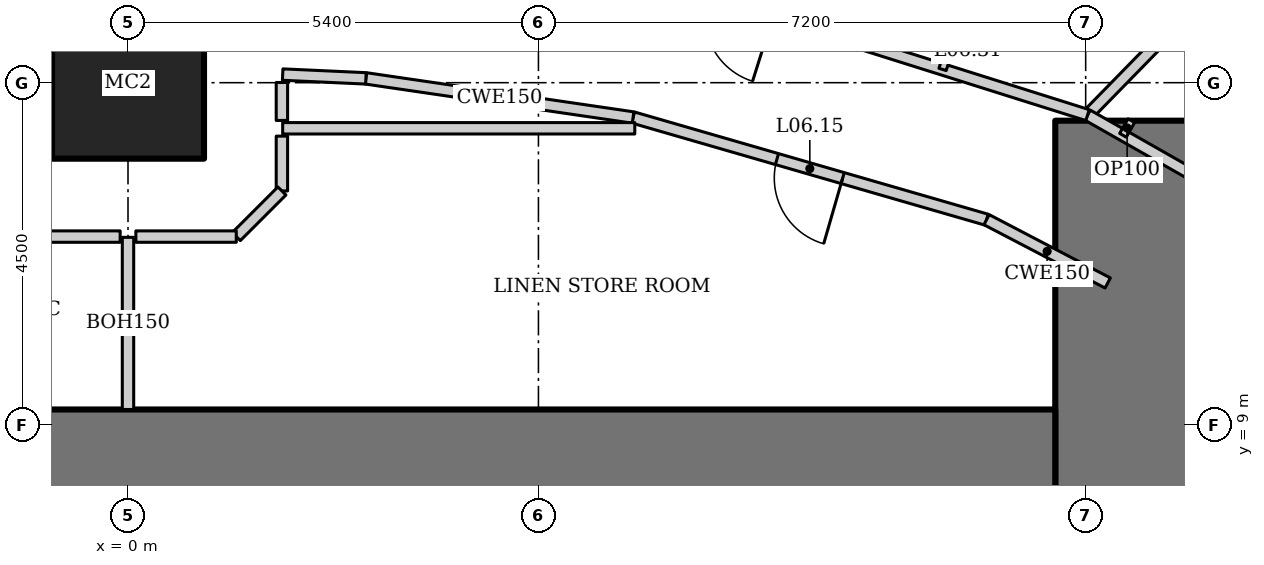
"""IFC4 building model, lengths in metres.
Left out: names, types, materials, properties, quantities, classifications, styles, units other than length and angle.
Written with IfcOpenShell. Run it as: python <this file> out.ifc"""

import sys

from ifc_helpers import new_model, si_unit, direction, frame, frame_2d, origin, origin_2d, place, context, subcontext, project, spatial, rectangle, hollow_rectangle, extrude, element, fill, save


model = new_model("IFC4")
c1 = context("Model", 3, precision=1e-05, world=origin(), true_north=direction((0.0, 1.0)))
c2 = subcontext(c1, "Body", "Model", "MODEL_VIEW")
j1 = project(units=[si_unit("LENGTHUNIT", "METRE"), si_unit("PLANEANGLEUNIT", "RADIAN")], contexts=[c1])
p1 = place(None, origin())
s1 = spatial("IfcSite", under=j1, at=p1, CompositionType="ELEMENT")
p2 = place(p1, origin())
s2 = spatial("IfcBuilding", under=s1, at=p2, CompositionType="ELEMENT")
p3 = place(p2, frame((0.0, 0.0, 37.0)))
s3 = spatial("IfcBuildingStorey", under=s2, at=p3, CompositionType="ELEMENT", Elevation=37.0)
p4 = place(p3, frame((0.0, 13.5, 0.0), z_axis=(0.0, 0.0, 1.0), x_axis=(1.0, 0.0, 0.0)))
e1 = element("IfcColumn", 1, at=p4, inside=s3, PredefinedType="COLUMN", context=c2, shape_type="SweptSolid", body=[
    extrude(hollow_rectangle(XDim=2.0, YDim=2.0, WallThickness=0.17, at=origin_2d()), origin(), (0.0, 0.0, 1.0), 3.6),
])
p5 = place(p3, frame((13.2, -13.0, 0.0), z_axis=(0.0, 0.0, 1.0), x_axis=(0.0, 1.0, 0.0)))
e2 = element("IfcWall", 2, at=p5, inside=s3, PredefinedType="SHEAR", context=c2, shape_type="SweptSolid", body=[
    extrude(rectangle(XDim=26.0, YDim=2.0, at=frame_2d((13.0, 0.0))), origin(), (0.0, 0.0, 1.0), 3.6),
])
p6 = place(p5, frame((12.1, 0.0, 0.0)))
e3 = element("IfcOpeningElement", 3, at=p6, cuts=e2, PredefinedType="OPENING", context=c2, shape_type="SweptSolid", body=[
    extrude(rectangle(XDim=1.8, YDim=2.1, at=frame_2d((0.9, 1.05))), frame((0.0, 1.01, 0.0), z_axis=(0.0, -1.0, 0.0), x_axis=(1.0, 0.0, 0.0)), (0.0, 0.0, 1.0), 2.02),
])
p7 = place(p3, frame((12.2, 8.0, 0.0), z_axis=(0.0, 0.0, 1.0), x_axis=(-1.0, 0.0, 0.0)))
e4 = element("IfcWall", 4, at=p7, inside=s3, PredefinedType="SHEAR", context=c2, shape_type="SweptSolid", body=[
    extrude(rectangle(XDim=24.4, YDim=2.4, at=frame_2d((12.2, 0.0))), origin(), (0.0, 0.0, 1.0), 3.6),
])
p8 = place(p3, frame((17.97, 18.542, 0.0), z_axis=(0.0, 0.0, 1.0), x_axis=(-0.699032031211, -0.715090357467, 0.0)))
e5 = element("IfcWall", 5, at=p8, inside=s3, PredefinedType="PARTITIONING", context=c2, shape_type="SweptSolid", body=[
    extrude(rectangle(XDim=7.647, YDim=0.15, at=frame_2d((3.824, 0.0))), origin(), (0.0, 0.0, 1.0), 2.528),
])
p9 = place(p3, frame((17.761, 10.149, 0.0), z_axis=(0.0, 0.0, 1.0), x_axis=(-0.86907565943, 0.494679187136, 0.0)))
e6 = element("IfcWall", 6, at=p9, inside=s3, PredefinedType="PARTITIONING", context=c2, shape_type="SweptSolid", body=[
    extrude(rectangle(XDim=5.911, YDim=0.15, at=frame_2d((2.955, 0.0))), origin(), (0.0, 0.0, 1.0), 3.45),
])
p10 = place(p9, frame((2.55, 0.0, 0.0)))
e7 = element("IfcOpeningElement", 7, at=p10, cuts=e6, PredefinedType="OPENING", context=c2, shape_type="SweptSolid", body=[
    extrude(rectangle(XDim=0.9, YDim=2.1, at=frame_2d((0.45, 1.05))), frame((0.0, 0.085, 0.0), z_axis=(0.0, -1.0, 0.0), x_axis=(1.0, 0.0, 0.0)), (0.0, 0.0, 1.0), 0.17),
])
p11 = place(p3, frame((12.625, 13.073, 0.0), z_axis=(0.0, 0.0, 1.0), x_axis=(-0.953774229808, 0.30052407317, 0.0)))
e8 = element("IfcWall", 8, at=p11, inside=s3, PredefinedType="PARTITIONING", context=c2, shape_type="SweptSolid", body=[
    extrude(rectangle(XDim=5.388, YDim=0.15, at=frame_2d((2.694, 0.0))), origin(), (0.0, 0.0, 1.0), 3.45),
])
p12 = place(p11, frame((4.338, 0.0, 0.0)))
e9 = element("IfcOpeningElement", 9, at=p12, cuts=e8, PredefinedType="OPENING", context=c2, shape_type="SweptSolid", body=[
    extrude(rectangle(XDim=0.9, YDim=2.1, at=frame_2d((0.45, 1.05))), frame((0.0, 0.085, 0.0), z_axis=(0.0, -1.0, 0.0), x_axis=(1.0, 0.0, 0.0)), (0.0, 0.0, 1.0), 0.17),
])
p13 = place(p3, frame((11.296, 11.698, 0.0), z_axis=(0.0, 0.0, 1.0), x_axis=(-0.960678318068, 0.277663770041, 0.0)))
e10 = element("IfcWall", 10, at=p13, inside=s3, PredefinedType="PARTITIONING", context=c2, shape_type="SweptSolid", body=[
    extrude(rectangle(XDim=4.841, YDim=0.15, at=frame_2d((2.421, 0.0))), origin(), (0.0, 0.0, 1.0), 3.45),
])
p14 = place(p13, frame((1.971, 0.0, 0.0)))
e11 = element("IfcOpeningElement", 11, at=p14, cuts=e10, PredefinedType="OPENING", context=c2, shape_type="SweptSolid", body=[
    extrude(rectangle(XDim=0.9, YDim=2.1, at=frame_2d((0.45, 1.05))), frame((0.0, 0.085, 0.0), z_axis=(0.0, -1.0, 0.0), x_axis=(1.0, 0.0, 0.0)), (0.0, 0.0, 1.0), 0.17),
])
p15 = place(p3, frame((6.645, 13.042, 0.0), z_axis=(0.0, 0.0, 1.0), x_axis=(-0.989443047021, 0.14492224364, 0.0)))
e12 = element("IfcWall", 12, at=p15, inside=s3, PredefinedType="PARTITIONING", context=c2, shape_type="SweptSolid", body=[
    extrude(rectangle(XDim=3.553, YDim=0.15, at=frame_2d((1.776, 0.0))), origin(), (0.0, 0.0, 1.0), 3.45),
])
p16 = place(p3, frame((10.717, 13.674, 0.0), z_axis=(0.0, 0.0, 1.0), x_axis=(0.30049839721, 0.953782319649, 0.0)))
e13 = element("IfcWall", 13, at=p16, inside=s3, PredefinedType="PARTITIONING", context=c2, shape_type="SweptSolid", body=[
    extrude(rectangle(XDim=2.4, YDim=0.1, at=frame_2d((1.2, 0.0))), origin(), (0.0, 0.0, 1.0), 3.45),
])
p17 = place(p16, frame((0.7, 0.0, 0.0)))
e14 = element("IfcOpeningElement", 14, at=p17, cuts=e13, PredefinedType="OPENING", context=c2, shape_type="SweptSolid", body=[
    extrude(rectangle(XDim=0.8, YDim=2.1, at=frame_2d((0.4, 1.05))), frame((0.0, 0.06, 0.0), z_axis=(0.0, -1.0, 0.0), x_axis=(1.0, 0.0, 0.0)), (0.0, 0.0, 1.0), 0.12),
])
p18 = place(p3, frame((13.2, 13.0, 0.0), z_axis=(0.0, 0.0, 1.0), x_axis=(-0.49435138335, -0.869262164011, 0.0)))
e15 = element("IfcWall", 15, at=p18, inside=s3, PredefinedType="PARTITIONING", context=c2, shape_type="SweptSolid", body=[
    extrude(rectangle(XDim=0.221, YDim=0.1, at=frame_2d((0.11, 0.0))), origin(), (0.0, 0.0, 1.0), 3.45),
])
p19 = place(p3, frame((3.13, 13.557, 0.0), z_axis=(0.0, 0.0, 1.0), x_axis=(-0.998946843147, 0.045882508292, 0.0)))
e16 = element("IfcWall", 16, at=p19, inside=s3, PredefinedType="PARTITIONING", context=c2, shape_type="SweptSolid", body=[
    extrude(rectangle(XDim=1.096, YDim=0.15, at=frame_2d((0.548, 0.0))), origin(), (0.0, 0.0, 1.0), 3.45),
])
p20 = place(p3, frame((0.0, 9.2, 0.0), z_axis=(0.0, 0.0, 1.0), x_axis=(0.0, 1.0, 0.0)))
e17 = element("IfcWall", 17, at=p20, inside=s3, PredefinedType="PARTITIONING", context=c2, shape_type="SweptSolid", body=[
    extrude(rectangle(XDim=2.265, YDim=0.15, at=frame_2d((1.133, 0.0))), origin(), (0.0, 0.0, 1.0), 3.044),
])
p21 = place(p3, frame((6.668, 12.9, 0.0), z_axis=(0.0, 0.0, 1.0), x_axis=(-1.0, 0.0, 0.0)))
e18 = element("IfcWall", 18, at=p21, inside=s3, PredefinedType="PARTITIONING", context=c2, shape_type="SweptSolid", body=[
    extrude(rectangle(XDim=4.633, YDim=0.15, at=frame_2d((2.316, 0.0))), origin(), (0.0, 0.0, 1.0), 3.45),
])
p22 = place(p3, frame((2.025, 12.797, 0.0), z_axis=(0.0, 0.0, 1.0), x_axis=(0.0, -1.0, 0.0)))
e19 = element("IfcWall", 19, at=p22, inside=s3, PredefinedType="PARTITIONING", context=c2, shape_type="SweptSolid", body=[
    extrude(rectangle(XDim=0.721, YDim=0.15, at=frame_2d((0.361, 0.0))), origin(), (0.0, 0.0, 1.0), 2.749),
])
p23 = place(p3, frame((2.025, 12.075, 0.0), z_axis=(0.0, 0.0, 1.0), x_axis=(-0.707106781187, -0.707106781187, 0.0)))
e20 = element("IfcWall", 20, at=p23, inside=s3, PredefinedType="PARTITIONING", context=c2, shape_type="SweptSolid", body=[
    extrude(rectangle(XDim=0.849, YDim=0.15, at=frame_2d((0.425, 0.0))), origin(), (0.0, 0.0, 1.0), 3.45),
])
for number, where, z_axis, x_axis in (
    (21, (1.425, 11.475, 0.0), (0.0, 0.0, 1.0), (-1.0, 0.0, 0.0)),
    (22, (-0.103, 11.475, 0.0), (0.0, 0.0, 1.0), (-1.0, 0.0, 0.0)),
):
    element("IfcWall", number, at=place(p3, frame(where, z_axis=z_axis, x_axis=x_axis)), inside=s3, PredefinedType="PARTITIONING", context=c2, shape_type="SweptSolid", body=[
        extrude(rectangle(XDim=1.321, YDim=0.15, at=frame_2d((0.661, 0.0))), origin(), (0.0, 0.0, 1.0), 3.45),
    ])
p24 = place(p3, frame((2.025, 13.503, 0.0), z_axis=(0.0, 0.0, 1.0), x_axis=(0.0, -1.0, 0.0)))
e23 = element("IfcWall", 23, at=p24, inside=s3, PredefinedType="PARTITIONING", context=c2, shape_type="SweptSolid", body=[
    extrude(rectangle(XDim=0.5, YDim=0.15, at=frame_2d((0.25, 0.0))), origin(), (0.0, 0.0, 1.0), 3.45),
])
p25 = place(p3, frame((12.89, 10.865, 0.0), z_axis=(0.0, 0.0, 1.0), x_axis=(-0.886301440762, 0.463108795104, 0.0)))
e24 = element("IfcWall", 24, at=p25, inside=s3, PredefinedType="PARTITIONING", context=c2, shape_type="SweptSolid", body=[
    extrude(rectangle(XDim=1.798, YDim=0.15, at=frame_2d((0.899, 0.0))), origin(), (0.0, 0.0, 1.0), 3.45),
])
p26 = place(p14, origin())
e25 = element("IfcDoor", 25, at=p26, inside=s3, OperationType="SINGLE_SWING_LEFT", PredefinedType="DOOR", context=c2, shape_type="SweptSolid", body=[
    extrude(rectangle(XDim=0.9, YDim=2.1, at=frame_2d((0.45, 1.05))), frame((0.0, 0.025, 0.0), z_axis=(0.0, -1.0, 0.0), x_axis=(1.0, 0.0, 0.0)), (0.0, 0.0, 1.0), 0.05),
])
fill(e11, e25)
save(model, sys.argv[1])
